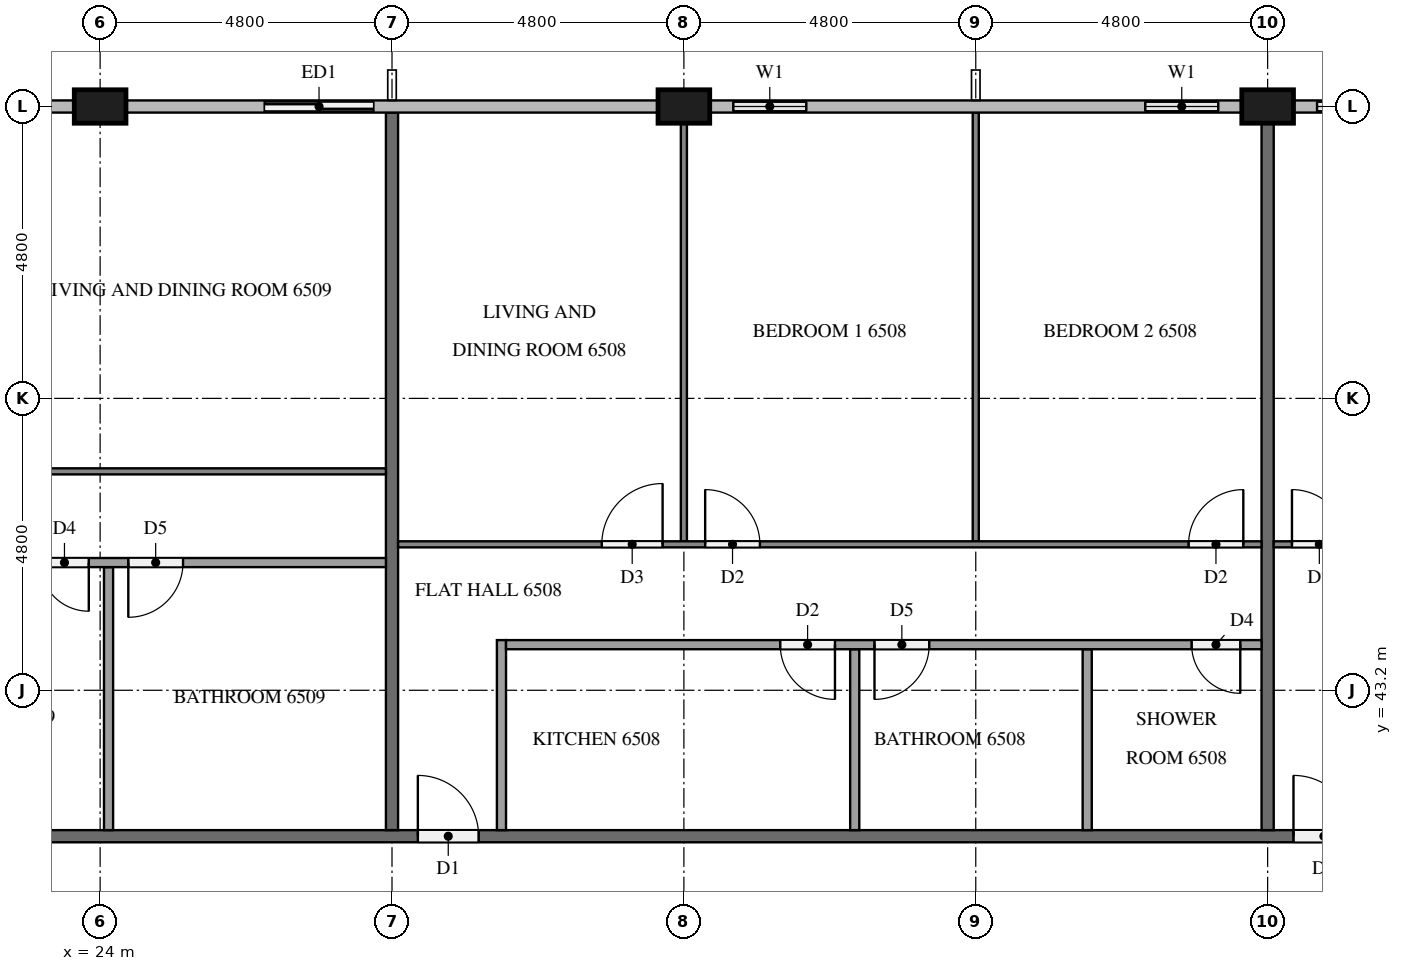
"""IFC4 building model, lengths in metres.
Left out: names, types, materials, properties, quantities, classifications, styles, units other than length and angle.
Written with IfcOpenShell. Run it as: python <this file> out.ifc"""

import sys

from ifc_helpers import new_model, si_unit, direction, frame, frame_2d, origin, origin_2d, place, context, subcontext, project, spatial, rectangle, extrude, element, fill, save


model = new_model("IFC4")
c1 = context("Model", 3, precision=1e-05, world=origin(), true_north=direction((0.0, 1.0)))
c2 = subcontext(c1, "Body", "Model", "MODEL_VIEW")
j1 = project(units=[si_unit("LENGTHUNIT", "METRE"), si_unit("PLANEANGLEUNIT", "RADIAN")], contexts=[c1])
p1 = place(None, origin())
s1 = spatial("IfcSite", under=j1, at=p1, CompositionType="ELEMENT")
p2 = place(p1, origin())
s2 = spatial("IfcBuilding", under=s1, at=p2, CompositionType="ELEMENT")
p3 = place(p2, frame((0.0, 0.0, 249.2)))
s3 = spatial("IfcBuildingStorey", under=s2, at=p3, CompositionType="ELEMENT", Elevation=249.2)
for number, where, z_axis, x_axis in (
    (1, (43.2, 52.8, 0.0), (0.0, 0.0, 1.0), (1.0, 0.0, 0.0)),
    (2, (33.6, 52.8, 0.0), (0.0, 0.0, 1.0), (1.0, 0.0, 0.0)),
    (3, (24.0, 52.8, 0.0), (0.0, 0.0, 1.0), (1.0, 0.0, 0.0)),
):
    element("IfcColumn", number, at=place(p3, frame(where, z_axis=z_axis, x_axis=x_axis)), inside=s3, PredefinedType="COLUMN", context=c2, shape_type="SweptSolid", body=[
        extrude(rectangle(XDim=0.85, YDim=0.55, at=origin_2d()), origin(), (0.0, 0.0, 1.0), 3.2),
    ])
p4 = place(p3, frame((45.6, 52.8, 0.0), z_axis=(0.0, 0.0, 1.0), x_axis=(-1.0, 0.0, 0.0)))
e4 = element("IfcWall", 4, at=p4, inside=s3, PredefinedType="SOLIDWALL", context=c2, shape_type="SweptSolid", body=[
    extrude(rectangle(XDim=1.975, YDim=0.15, at=frame_2d((0.988, 0.0))), origin(), (0.0, 0.0, 1.0), 3.2),
])
p5 = place(p4, frame((0.387, 0.0, 0.9)))
e5 = element("IfcOpeningElement", 5, at=p5, cuts=e4, PredefinedType="OPENING", context=c2, shape_type="SweptSolid", body=[
    extrude(rectangle(XDim=1.2, YDim=1.4, at=frame_2d((0.6, 0.7))), frame((0.0, 0.085, 0.0), z_axis=(0.0, -1.0, 0.0), x_axis=(1.0, 0.0, 0.0)), (0.0, 0.0, 1.0), 0.17),
])
p6 = place(p3, frame((42.775, 52.8, 0.0), z_axis=(0.0, 0.0, 1.0), x_axis=(-1.0, 0.0, 0.0)))
e6 = element("IfcWall", 6, at=p6, inside=s3, PredefinedType="SOLIDWALL", context=c2, shape_type="SweptSolid", body=[
    extrude(rectangle(XDim=1.975, YDim=0.15, at=frame_2d((0.987, 0.0))), origin(), (0.0, 0.0, 1.0), 3.2),
])
p7 = place(p6, frame((0.387, 0.0, 0.9)))
e7 = element("IfcOpeningElement", 7, at=p7, cuts=e6, PredefinedType="OPENING", context=c2, shape_type="SweptSolid", body=[
    extrude(rectangle(XDim=1.2, YDim=1.4, at=frame_2d((0.6, 0.7))), frame((0.0, 0.085, 0.0), z_axis=(0.0, -1.0, 0.0), x_axis=(1.0, 0.0, 0.0)), (0.0, 0.0, 1.0), 0.17),
])
p8 = place(p3, frame((36.0, 52.8, 0.0), z_axis=(0.0, 0.0, 1.0), x_axis=(-1.0, 0.0, 0.0)))
e8 = element("IfcWall", 8, at=p8, inside=s3, PredefinedType="SOLIDWALL", context=c2, shape_type="SweptSolid", body=[
    extrude(rectangle(XDim=1.975, YDim=0.15, at=frame_2d((0.988, 0.0))), origin(), (0.0, 0.0, 1.0), 3.2),
])
p9 = place(p8, frame((0.387, 0.0, 0.9)))
e9 = element("IfcOpeningElement", 9, at=p9, cuts=e8, PredefinedType="OPENING", context=c2, shape_type="SweptSolid", body=[
    extrude(rectangle(XDim=1.2, YDim=1.4, at=frame_2d((0.6, 0.7))), frame((0.0, 0.085, 0.0), z_axis=(0.0, -1.0, 0.0), x_axis=(1.0, 0.0, 0.0)), (0.0, 0.0, 1.0), 0.17),
])
p10 = place(p3, frame((28.8, 52.8, 0.0), z_axis=(0.0, 0.0, 1.0), x_axis=(-1.0, 0.0, 0.0)))
e10 = element("IfcWall", 10, at=p10, inside=s3, PredefinedType="SOLIDWALL", context=c2, shape_type="SweptSolid", body=[
    extrude(rectangle(XDim=2.4, YDim=0.15, at=frame_2d((1.2, 0.0))), origin(), (0.0, 0.0, 1.0), 3.2),
])
p11 = place(p10, frame((0.3, 0.0, 0.0)))
e11 = element("IfcOpeningElement", 11, at=p11, cuts=e10, PredefinedType="OPENING", context=c2, shape_type="SweptSolid", body=[
    extrude(rectangle(XDim=1.8, YDim=2.4, at=frame_2d((0.9, 1.2))), frame((0.0, 0.085, 0.0), z_axis=(0.0, -1.0, 0.0), x_axis=(1.0, 0.0, 0.0)), (0.0, 0.0, 1.0), 0.17),
])
p12 = place(p3, frame((11.9, 40.8, 0.0), z_axis=(0.0, 0.0, 1.0), x_axis=(1.0, 0.0, 0.0)))
e12 = element("IfcWall", 12, at=p12, inside=s3, PredefinedType="PARTITIONING", context=c2, shape_type="SweptSolid", body=[
    extrude(rectangle(XDim=38.6, YDim=0.2, at=frame_2d((19.3, 0.0))), origin(), (0.0, 0.0, 1.0), 3.2),
])
p13 = place(p12, frame((31.725, 0.0, 0.0)))
e13 = element("IfcOpeningElement", 13, at=p13, cuts=e12, PredefinedType="OPENING", context=c2, shape_type="SweptSolid", body=[
    extrude(rectangle(XDim=1.0, YDim=2.1, at=frame_2d((0.5, 1.05))), frame((0.0, 0.11, 0.0), z_axis=(0.0, -1.0, 0.0), x_axis=(1.0, 0.0, 0.0)), (0.0, 0.0, 1.0), 0.22),
])
p14 = place(p12, frame((17.325, 0.0, 0.0)))
e14 = element("IfcOpeningElement", 14, at=p14, cuts=e12, PredefinedType="OPENING", context=c2, shape_type="SweptSolid", body=[
    extrude(rectangle(XDim=1.0, YDim=2.1, at=frame_2d((0.5, 1.05))), frame((0.0, 0.11, 0.0), z_axis=(0.0, -1.0, 0.0), x_axis=(1.0, 0.0, 0.0)), (0.0, 0.0, 1.0), 0.22),
])
p15 = place(p12, frame((0.525, 0.0, 0.0)))
e15 = element("IfcOpeningElement", 15, at=p15, cuts=e12, PredefinedType="OPENING", context=c2, shape_type="SweptSolid", body=[
    extrude(rectangle(XDim=1.0, YDim=2.1, at=frame_2d((0.5, 1.05))), frame((0.0, 0.11, 0.0), z_axis=(0.0, -1.0, 0.0), x_axis=(1.0, 0.0, 0.0)), (0.0, 0.0, 1.0), 0.22),
])
p16 = place(p3, frame((43.2, 52.525, 0.0), z_axis=(0.0, 0.0, 1.0), x_axis=(0.0, -1.0, 0.0)))
e16 = element("IfcWall", 16, at=p16, inside=s3, PredefinedType="PARTITIONING", context=c2, shape_type="SweptSolid", body=[
    extrude(rectangle(XDim=11.625, YDim=0.2, at=frame_2d((5.812, 0.0))), origin(), (0.0, 0.0, 1.0), 3.2),
])
p17 = place(p3, frame((28.8, 52.7, 0.0), z_axis=(0.0, 0.0, 1.0), x_axis=(0.0, -1.0, 0.0)))
e17 = element("IfcWall", 17, at=p17, inside=s3, PredefinedType="PARTITIONING", context=c2, shape_type="SweptSolid", body=[
    extrude(rectangle(XDim=11.8, YDim=0.2, at=frame_2d((5.9, 0.0))), origin(), (0.0, 0.0, 1.0), 3.2),
])
p18 = place(p3, frame((43.3, 45.6, 0.0), z_axis=(0.0, 0.0, 1.0), x_axis=(1.0, 0.0, 0.0)))
e18 = element("IfcWall", 18, at=p18, inside=s3, PredefinedType="PARTITIONING", context=c2, shape_type="SweptSolid", body=[
    extrude(rectangle(XDim=14.2, YDim=0.1, at=frame_2d((7.1, 0.0))), origin(), (0.0, 0.0, 1.0), 3.2),
])
p19 = place(p18, frame((0.3, 0.0, 0.0)))
e19 = element("IfcOpeningElement", 19, at=p19, cuts=e18, PredefinedType="OPENING", context=c2, shape_type="SweptSolid", body=[
    extrude(rectangle(XDim=0.9, YDim=2.1, at=frame_2d((0.45, 1.05))), frame((0.0, 0.06, 0.0), z_axis=(0.0, -1.0, 0.0), x_axis=(1.0, 0.0, 0.0)), (0.0, 0.0, 1.0), 0.12),
])
p20 = place(p18, frame((8.25, 0.0, 0.0)))
e20 = element("IfcOpeningElement", 20, at=p20, cuts=e18, PredefinedType="OPENING", context=c2, shape_type="SweptSolid", body=[
    extrude(rectangle(XDim=0.9, YDim=2.1, at=frame_2d((0.45, 1.05))), frame((0.0, 0.06, 0.0), z_axis=(0.0, -1.0, 0.0), x_axis=(1.0, 0.0, 0.0)), (0.0, 0.0, 1.0), 0.12),
])
p21 = place(p18, frame((9.85, 0.0, 0.0)))
e21 = element("IfcOpeningElement", 21, at=p21, cuts=e18, PredefinedType="OPENING", context=c2, shape_type="SweptSolid", body=[
    extrude(rectangle(XDim=1.0, YDim=2.1, at=frame_2d((0.5, 1.05))), frame((0.0, 0.06, 0.0), z_axis=(0.0, -1.0, 0.0), x_axis=(1.0, 0.0, 0.0)), (0.0, 0.0, 1.0), 0.12),
])
p22 = place(p3, frame((33.6, 45.65, 0.0), z_axis=(0.0, 0.0, 1.0), x_axis=(0.0, 1.0, 0.0)))
e22 = element("IfcWall", 22, at=p22, inside=s3, PredefinedType="PARTITIONING", context=c2, shape_type="SweptSolid", body=[
    extrude(rectangle(XDim=6.875, YDim=0.1, at=frame_2d((3.438, 0.0))), origin(), (0.0, 0.0, 1.0), 3.2),
])
p23 = place(p3, frame((38.4, 45.65, 0.0), z_axis=(0.0, 0.0, 1.0), x_axis=(0.0, 1.0, 0.0)))
e23 = element("IfcWall", 23, at=p23, inside=s3, PredefinedType="PARTITIONING", context=c2, shape_type="SweptSolid", body=[
    extrude(rectangle(XDim=7.05, YDim=0.1, at=frame_2d((3.525, 0.0))), origin(), (0.0, 0.0, 1.0), 3.2),
])
p24 = place(p3, frame((28.9, 45.6, 0.0), z_axis=(0.0, 0.0, 1.0), x_axis=(1.0, 0.0, 0.0)))
e24 = element("IfcWall", 24, at=p24, inside=s3, PredefinedType="PARTITIONING", context=c2, shape_type="SweptSolid", body=[
    extrude(rectangle(XDim=14.2, YDim=0.1, at=frame_2d((7.1, 0.0))), origin(), (0.0, 0.0, 1.0), 3.2),
])
p25 = place(p24, frame((3.35, 0.0, 0.0)))
e25 = element("IfcOpeningElement", 25, at=p25, cuts=e24, PredefinedType="OPENING", context=c2, shape_type="SweptSolid", body=[
    extrude(rectangle(XDim=1.0, YDim=2.1, at=frame_2d((0.5, 1.05))), frame((0.0, 0.06, 0.0), z_axis=(0.0, -1.0, 0.0), x_axis=(1.0, 0.0, 0.0)), (0.0, 0.0, 1.0), 0.12),
])
p26 = place(p24, frame((5.05, 0.0, 0.0)))
e26 = element("IfcOpeningElement", 26, at=p26, cuts=e24, PredefinedType="OPENING", context=c2, shape_type="SweptSolid", body=[
    extrude(rectangle(XDim=0.9, YDim=2.1, at=frame_2d((0.45, 1.05))), frame((0.0, 0.06, 0.0), z_axis=(0.0, -1.0, 0.0), x_axis=(1.0, 0.0, 0.0)), (0.0, 0.0, 1.0), 0.12),
])
p27 = place(p24, frame((13.0, 0.0, 0.0)))
e27 = element("IfcOpeningElement", 27, at=p27, cuts=e24, PredefinedType="OPENING", context=c2, shape_type="SweptSolid", body=[
    extrude(rectangle(XDim=0.9, YDim=2.1, at=frame_2d((0.45, 1.05))), frame((0.0, 0.06, 0.0), z_axis=(0.0, -1.0, 0.0), x_axis=(1.0, 0.0, 0.0)), (0.0, 0.0, 1.0), 0.12),
])
for number, where, z_axis, x_axis in (
    (28, (36.41, 40.9, 0.0), (0.0, 0.0, 1.0), (0.0, 1.0, 0.0)),
    (29, (40.233, 40.9, 0.0), (0.0, 0.0, 1.0), (0.0, 1.0, 0.0)),
):
    element("IfcWall", number, at=place(p3, frame(where, z_axis=z_axis, x_axis=x_axis)), inside=s3, PredefinedType="PARTITIONING", context=c2, shape_type="SweptSolid", body=[
        extrude(rectangle(XDim=2.975, YDim=0.15, at=frame_2d((1.488, 0.0))), origin(), (0.0, 0.0, 1.0), 3.2),
    ])
p28 = place(p3, frame((30.6, 40.9, 0.0), z_axis=(0.0, 0.0, 1.0), x_axis=(0.0, 1.0, 0.0)))
e30 = element("IfcWall", 30, at=p28, inside=s3, PredefinedType="PARTITIONING", context=c2, shape_type="SweptSolid", body=[
    extrude(rectangle(XDim=3.125, YDim=0.15, at=frame_2d((1.562, 0.0))), origin(), (0.0, 0.0, 1.0), 3.2),
])
p29 = place(p3, frame((43.1, 43.95, 0.0), z_axis=(0.0, 0.0, 1.0), x_axis=(-1.0, 0.0, 0.0)))
e31 = element("IfcWall", 31, at=p29, inside=s3, PredefinedType="PARTITIONING", context=c2, shape_type="SweptSolid", body=[
    extrude(rectangle(XDim=12.425, YDim=0.15, at=frame_2d((6.212, 0.0))), origin(), (0.0, 0.0, 1.0), 3.2),
])
p30 = place(p29, frame((7.015, 0.0, 0.0)))
e32 = element("IfcOpeningElement", 32, at=p30, cuts=e31, PredefinedType="OPENING", context=c2, shape_type="SweptSolid", body=[
    extrude(rectangle(XDim=0.9, YDim=2.1, at=frame_2d((0.45, 1.05))), frame((0.0, 0.085, 0.0), z_axis=(0.0, -1.0, 0.0), x_axis=(1.0, 0.0, 0.0)), (0.0, 0.0, 1.0), 0.17),
])
p31 = place(p29, frame((5.465, 0.0, 0.0)))
e33 = element("IfcOpeningElement", 33, at=p31, cuts=e31, PredefinedType="OPENING", context=c2, shape_type="SweptSolid", body=[
    extrude(rectangle(XDim=0.9, YDim=2.1, at=frame_2d((0.45, 1.05))), frame((0.0, 0.085, 0.0), z_axis=(0.0, -1.0, 0.0), x_axis=(1.0, 0.0, 0.0)), (0.0, 0.0, 1.0), 0.17),
])
p32 = place(p29, frame((0.35, 0.0, 0.0)))
e34 = element("IfcOpeningElement", 34, at=p32, cuts=e31, PredefinedType="OPENING", context=c2, shape_type="SweptSolid", body=[
    extrude(rectangle(XDim=0.8, YDim=2.1, at=frame_2d((0.4, 1.05))), frame((0.0, 0.085, 0.0), z_axis=(0.0, -1.0, 0.0), x_axis=(1.0, 0.0, 0.0)), (0.0, 0.0, 1.0), 0.17),
])
p33 = place(p3, frame((12.1, 46.8, 0.0), z_axis=(0.0, 0.0, 1.0), x_axis=(1.0, 0.0, 0.0)))
e35 = element("IfcWall", 35, at=p33, inside=s3, PredefinedType="PARTITIONING", context=c2, shape_type="SweptSolid", body=[
    extrude(rectangle(XDim=16.6, YDim=0.1, at=frame_2d((8.3, 0.0))), origin(), (0.0, 0.0, 1.0), 3.2),
])
p34 = place(p33, frame((0.3, 0.0, 0.0)))
e36 = element("IfcOpeningElement", 36, at=p34, cuts=e35, PredefinedType="OPENING", context=c2, shape_type="SweptSolid", body=[
    extrude(rectangle(XDim=0.9, YDim=2.1, at=frame_2d((0.45, 1.05))), frame((0.0, 0.06, 0.0), z_axis=(0.0, -1.0, 0.0), x_axis=(1.0, 0.0, 0.0)), (0.0, 0.0, 1.0), 0.12),
])
p35 = place(p33, frame((8.25, 0.0, 0.0)))
e37 = element("IfcOpeningElement", 37, at=p35, cuts=e35, PredefinedType="OPENING", context=c2, shape_type="SweptSolid", body=[
    extrude(rectangle(XDim=0.9, YDim=2.1, at=frame_2d((0.45, 1.05))), frame((0.0, 0.06, 0.0), z_axis=(0.0, -1.0, 0.0), x_axis=(1.0, 0.0, 0.0)), (0.0, 0.0, 1.0), 0.12),
])
p36 = place(p33, frame((9.85, 0.0, 0.0)))
e38 = element("IfcOpeningElement", 38, at=p36, cuts=e35, PredefinedType="OPENING", context=c2, shape_type="SweptSolid", body=[
    extrude(rectangle(XDim=1.0, YDim=2.1, at=frame_2d((0.5, 1.05))), frame((0.0, 0.06, 0.0), z_axis=(0.0, -1.0, 0.0), x_axis=(1.0, 0.0, 0.0)), (0.0, 0.0, 1.0), 0.12),
])
p37 = place(p3, frame((24.138, 40.9, 0.0), z_axis=(0.0, 0.0, 1.0), x_axis=(0.0, 1.0, 0.0)))
e39 = element("IfcWall", 39, at=p37, inside=s3, PredefinedType="PARTITIONING", context=c2, shape_type="SweptSolid", body=[
    extrude(rectangle(XDim=4.325, YDim=0.15, at=frame_2d((2.163, 0.0))), origin(), (0.0, 0.0, 1.0), 3.2),
])
p38 = place(p3, frame((28.7, 45.3, 0.0), z_axis=(0.0, 0.0, 1.0), x_axis=(-1.0, 0.0, 0.0)))
e40 = element("IfcWall", 40, at=p38, inside=s3, PredefinedType="PARTITIONING", context=c2, shape_type="SweptSolid", body=[
    extrude(rectangle(XDim=14.825, YDim=0.15, at=frame_2d((7.413, 0.0))), origin(), (0.0, 0.0, 1.0), 3.2),
])
p39 = place(p38, frame((13.625, 0.0, 0.0)))
e41 = element("IfcOpeningElement", 41, at=p39, cuts=e40, PredefinedType="OPENING", context=c2, shape_type="SweptSolid", body=[
    extrude(rectangle(XDim=0.9, YDim=2.1, at=frame_2d((0.45, 1.05))), frame((0.0, 0.085, 0.0), z_axis=(0.0, -1.0, 0.0), x_axis=(1.0, 0.0, 0.0)), (0.0, 0.0, 1.0), 0.17),
])
p40 = place(p38, frame((4.886, 0.0, 0.0)))
e42 = element("IfcOpeningElement", 42, at=p40, cuts=e40, PredefinedType="OPENING", context=c2, shape_type="SweptSolid", body=[
    extrude(rectangle(XDim=0.8, YDim=2.1, at=frame_2d((0.4, 1.05))), frame((0.0, 0.085, 0.0), z_axis=(0.0, -1.0, 0.0), x_axis=(1.0, 0.0, 0.0)), (0.0, 0.0, 1.0), 0.17),
])
p41 = place(p38, frame((3.336, 0.0, 0.0)))
e43 = element("IfcOpeningElement", 43, at=p41, cuts=e40, PredefinedType="OPENING", context=c2, shape_type="SweptSolid", body=[
    extrude(rectangle(XDim=0.9, YDim=2.1, at=frame_2d((0.45, 1.05))), frame((0.0, 0.085, 0.0), z_axis=(0.0, -1.0, 0.0), x_axis=(1.0, 0.0, 0.0)), (0.0, 0.0, 1.0), 0.17),
])
p42 = place(p5, origin())
e44 = element("IfcWindow", 44, at=p42, inside=s3, PartitioningType="SINGLE_PANEL", PredefinedType="WINDOW", context=c2, shape_type="SweptSolid", body=[
    extrude(rectangle(XDim=1.2, YDim=1.4, at=frame_2d((0.6, 0.7))), frame((0.0, 0.03, 0.0), z_axis=(0.0, -1.0, 0.0), x_axis=(1.0, 0.0, 0.0)), (0.0, 0.0, 1.0), 0.06),
])
fill(e5, e44)
p43 = place(p7, origin())
e45 = element("IfcWindow", 45, at=p43, inside=s3, PartitioningType="SINGLE_PANEL", PredefinedType="WINDOW", context=c2, shape_type="SweptSolid", body=[
    extrude(rectangle(XDim=1.2, YDim=1.4, at=frame_2d((0.6, 0.7))), frame((0.0, 0.03, 0.0), z_axis=(0.0, -1.0, 0.0), x_axis=(1.0, 0.0, 0.0)), (0.0, 0.0, 1.0), 0.06),
])
fill(e7, e45)
p44 = place(p9, origin())
e46 = element("IfcWindow", 46, at=p44, inside=s3, PartitioningType="SINGLE_PANEL", PredefinedType="WINDOW", context=c2, shape_type="SweptSolid", body=[
    extrude(rectangle(XDim=1.2, YDim=1.4, at=frame_2d((0.6, 0.7))), frame((0.0, 0.03, 0.0), z_axis=(0.0, -1.0, 0.0), x_axis=(1.0, 0.0, 0.0)), (0.0, 0.0, 1.0), 0.06),
])
fill(e9, e46)
p45 = place(p11, origin())
e47 = element("IfcDoor", 47, at=p45, inside=s3, OperationType="SLIDING_TO_LEFT", PredefinedType="DOOR", context=c2, shape_type="SweptSolid", body=[
    extrude(rectangle(XDim=1.8, YDim=2.4, at=frame_2d((0.9, 1.2))), frame((0.0, 0.025, 0.0), z_axis=(0.0, -1.0, 0.0), x_axis=(1.0, 0.0, 0.0)), (0.0, 0.0, 1.0), 0.05),
])
fill(e11, e47)
p46 = place(p13, origin())
e48 = element("IfcDoor", 48, at=p46, inside=s3, OperationType="SINGLE_SWING_LEFT", PredefinedType="DOOR", context=c2, shape_type="SweptSolid", body=[
    extrude(rectangle(XDim=1.0, YDim=2.1, at=frame_2d((0.5, 1.05))), frame((0.0, 0.025, 0.0), z_axis=(0.0, -1.0, 0.0), x_axis=(1.0, 0.0, 0.0)), (0.0, 0.0, 1.0), 0.05),
])
fill(e13, e48)
p47 = place(p14, origin())
e49 = element("IfcDoor", 49, at=p47, inside=s3, OperationType="SINGLE_SWING_LEFT", PredefinedType="DOOR", context=c2, shape_type="SweptSolid", body=[
    extrude(rectangle(XDim=1.0, YDim=2.1, at=frame_2d((0.5, 1.05))), frame((0.0, 0.025, 0.0), z_axis=(0.0, -1.0, 0.0), x_axis=(1.0, 0.0, 0.0)), (0.0, 0.0, 1.0), 0.05),
])
fill(e14, e49)
p48 = place(p19, origin())
e50 = element("IfcDoor", 50, at=p48, inside=s3, OperationType="SINGLE_SWING_LEFT", PredefinedType="DOOR", context=c2, shape_type="SweptSolid", body=[
    extrude(rectangle(XDim=0.9, YDim=2.1, at=frame_2d((0.45, 1.05))), frame((0.0, 0.025, 0.0), z_axis=(0.0, -1.0, 0.0), x_axis=(1.0, 0.0, 0.0)), (0.0, 0.0, 1.0), 0.05),
])
fill(e19, e50)
p49 = place(p25, origin())
e51 = element("IfcDoor", 51, at=p49, inside=s3, OperationType="SINGLE_SWING_RIGHT", PredefinedType="DOOR", context=c2, shape_type="SweptSolid", body=[
    extrude(rectangle(XDim=1.0, YDim=2.1, at=frame_2d((0.5, 1.05))), frame((0.0, 0.025, 0.0), z_axis=(0.0, -1.0, 0.0), x_axis=(1.0, 0.0, 0.0)), (0.0, 0.0, 1.0), 0.05),
])
fill(e25, e51)
p50 = place(p26, origin())
e52 = element("IfcDoor", 52, at=p50, inside=s3, OperationType="SINGLE_SWING_LEFT", PredefinedType="DOOR", context=c2, shape_type="SweptSolid", body=[
    extrude(rectangle(XDim=0.9, YDim=2.1, at=frame_2d((0.45, 1.05))), frame((0.0, 0.025, 0.0), z_axis=(0.0, -1.0, 0.0), x_axis=(1.0, 0.0, 0.0)), (0.0, 0.0, 1.0), 0.05),
])
fill(e26, e52)
p51 = place(p27, origin())
e53 = element("IfcDoor", 53, at=p51, inside=s3, OperationType="SINGLE_SWING_RIGHT", PredefinedType="DOOR", context=c2, shape_type="SweptSolid", body=[
    extrude(rectangle(XDim=0.9, YDim=2.1, at=frame_2d((0.45, 1.05))), frame((0.0, 0.025, 0.0), z_axis=(0.0, -1.0, 0.0), x_axis=(1.0, 0.0, 0.0)), (0.0, 0.0, 1.0), 0.05),
])
fill(e27, e53)
p52 = place(p30, origin())
e54 = element("IfcDoor", 54, at=p52, inside=s3, OperationType="SINGLE_SWING_LEFT", PredefinedType="DOOR", context=c2, shape_type="SweptSolid", body=[
    extrude(rectangle(XDim=0.9, YDim=2.1, at=frame_2d((0.45, 1.05))), frame((0.0, 0.025, 0.0), z_axis=(0.0, -1.0, 0.0), x_axis=(1.0, 0.0, 0.0)), (0.0, 0.0, 1.0), 0.05),
])
fill(e32, e54)
p53 = place(p31, origin())
e55 = element("IfcDoor", 55, at=p53, inside=s3, OperationType="SINGLE_SWING_RIGHT", PredefinedType="DOOR", context=c2, shape_type="SweptSolid", body=[
    extrude(rectangle(XDim=0.9, YDim=2.1, at=frame_2d((0.45, 1.05))), frame((0.0, 0.025, 0.0), z_axis=(0.0, -1.0, 0.0), x_axis=(1.0, 0.0, 0.0)), (0.0, 0.0, 1.0), 0.05),
])
fill(e33, e55)
p54 = place(p32, origin())
e56 = element("IfcDoor", 56, at=p54, inside=s3, OperationType="SINGLE_SWING_LEFT", PredefinedType="DOOR", context=c2, shape_type="SweptSolid", body=[
    extrude(rectangle(XDim=0.8, YDim=2.1, at=frame_2d((0.4, 1.05))), frame((0.0, 0.025, 0.0), z_axis=(0.0, -1.0, 0.0), x_axis=(1.0, 0.0, 0.0)), (0.0, 0.0, 1.0), 0.05),
])
fill(e34, e56)
p55 = place(p40, origin())
e57 = element("IfcDoor", 57, at=p55, inside=s3, OperationType="SINGLE_SWING_LEFT", PredefinedType="DOOR", context=c2, shape_type="SweptSolid", body=[
    extrude(rectangle(XDim=0.8, YDim=2.1, at=frame_2d((0.4, 1.05))), frame((0.0, 0.025, 0.0), z_axis=(0.0, -1.0, 0.0), x_axis=(1.0, 0.0, 0.0)), (0.0, 0.0, 1.0), 0.05),
])
fill(e42, e57)
p56 = place(p41, origin())
e58 = element("IfcDoor", 58, at=p56, inside=s3, OperationType="SINGLE_SWING_RIGHT", PredefinedType="DOOR", context=c2, shape_type="SweptSolid", body=[
    extrude(rectangle(XDim=0.9, YDim=2.1, at=frame_2d((0.45, 1.05))), frame((0.0, 0.025, 0.0), z_axis=(0.0, -1.0, 0.0), x_axis=(1.0, 0.0, 0.0)), (0.0, 0.0, 1.0), 0.05),
])
fill(e43, e58)
save(model, sys.argv[1])
